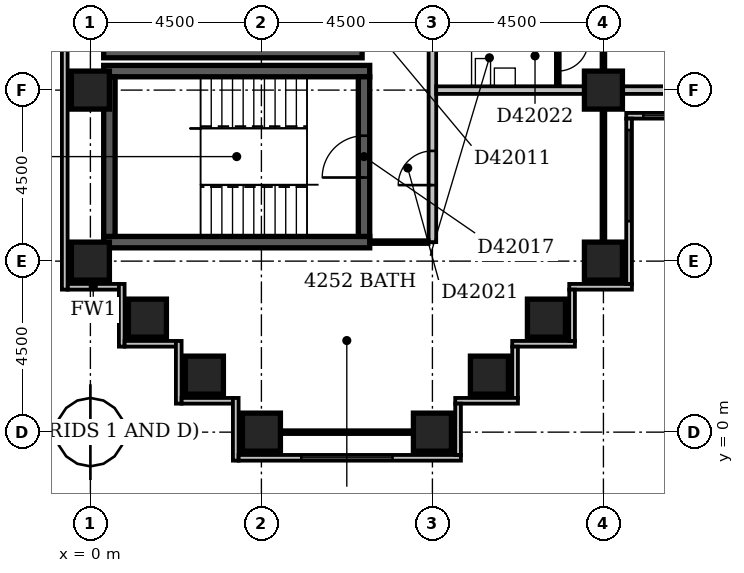
"""IFC4 building model, lengths in metres.
Left out: names, types, materials, properties, quantities, classifications, styles, units other than length and angle.
Written with IfcOpenShell. Run it as: python <this file> out.ifc"""

import sys

from ifc_helpers import new_model, si_unit, direction, frame, frame_2d, origin, origin_2d, place, context, subcontext, project, spatial, rectangle, extrude, element, fill, save


model = new_model("IFC4")
c1 = context("Model", 3, precision=1e-05, world=origin(), true_north=direction((0.0, 1.0)))
c2 = subcontext(c1, "Body", "Model", "MODEL_VIEW")
j1 = project(units=[si_unit("LENGTHUNIT", "METRE"), si_unit("PLANEANGLEUNIT", "RADIAN")], contexts=[c1])
p1 = place(None, origin())
s1 = spatial("IfcSite", under=j1, at=p1, CompositionType="ELEMENT")
p2 = place(p1, origin())
s2 = spatial("IfcBuilding", under=s1, at=p2, CompositionType="ELEMENT")
p3 = place(p2, frame((0.0, 0.0, 166.4)))
s3 = spatial("IfcBuildingStorey", under=s2, at=p3, CompositionType="ELEMENT", Elevation=166.4)
for number, where, z_axis, x_axis in (
    (1, (0.35, 5.0, -0.3), (0.0, 0.0, 1.0), (1.0, 0.0, 0.0)),
    (2, (0.35, 9.5, -0.3), (0.0, 0.0, 1.0), (1.0, 0.0, 0.0)),
):
    element("IfcWall", number, at=place(p3, frame(where, z_axis=z_axis, x_axis=x_axis)), inside=s3, PredefinedType="SHEAR", context=c2, shape_type="SweptSolid", body=[
        extrude(rectangle(XDim=7.0, YDim=0.3, at=frame_2d((3.5, 0.0))), origin(), (0.0, 0.0, 1.0), 3.6),
    ])
p4 = place(p3, frame((0.35, 10.0, -0.3), z_axis=(0.0, 0.0, 1.0), x_axis=(1.0, 0.0, 0.0)))
e3 = element("IfcWall", 3, at=p4, inside=s3, PredefinedType="SHEAR", context=c2, shape_type="SweptSolid", body=[
    extrude(rectangle(XDim=6.8, YDim=0.3, at=frame_2d((3.4, 0.0))), origin(), (0.0, 0.0, 1.0), 3.6),
])
p5 = place(p3, frame((0.5, 5.15, -0.3), z_axis=(0.0, 0.0, 1.0), x_axis=(0.0, 1.0, 0.0)))
e4 = element("IfcWall", 4, at=p5, inside=s3, PredefinedType="SHEAR", context=c2, shape_type="SweptSolid", body=[
    extrude(rectangle(XDim=4.2, YDim=0.3, at=frame_2d((2.1, 0.0))), origin(), (0.0, 0.0, 1.0), 3.6),
])
p6 = place(p3, frame((7.2, 5.15, -0.3), z_axis=(0.0, 0.0, 1.0), x_axis=(0.0, 1.0, 0.0)))
e5 = element("IfcWall", 5, at=p6, inside=s3, PredefinedType="SHEAR", context=c2, shape_type="SweptSolid", body=[
    extrude(rectangle(XDim=4.2, YDim=0.3, at=frame_2d((2.1, 0.0))), origin(), (0.0, 0.0, 1.0), 3.6),
])
p7 = place(p6, frame((1.55, 0.0, 0.3)))
e6 = element("IfcOpeningElement", 6, at=p7, cuts=e5, PredefinedType="OPENING", context=c2, shape_type="SweptSolid", body=[
    extrude(rectangle(XDim=1.1, YDim=2.1, at=frame_2d((0.55, 1.05))), frame((0.0, 0.162, 0.0), z_axis=(0.0, -1.0, 0.0), x_axis=(1.0, 0.0, 0.0)), (0.0, 0.0, 1.0), 0.324),
])
for number, where, z_axis, x_axis in (
    (7, (4.5, 0.0, -0.3), (0.0, 0.0, 1.0), (1.0, 0.0, 0.0)),
    (8, (9.0, 0.0, -0.3), (0.0, 0.0, 1.0), (1.0, 0.0, 0.0)),
    (9, (3.0, 1.5, -0.3), (0.0, 0.0, 1.0), (1.0, 0.0, 0.0)),
    (10, (10.5, 1.5, -0.3), (0.0, 0.0, 1.0), (1.0, 0.0, 0.0)),
    (11, (1.5, 3.0, -0.3), (0.0, 0.0, 1.0), (1.0, 0.0, 0.0)),
    (12, (12.0, 3.0, -0.3), (0.0, 0.0, 1.0), (1.0, 0.0, 0.0)),
    (13, (0.0, 4.5, -0.3), (0.0, 0.0, 1.0), (1.0, 0.0, 0.0)),
    (14, (13.5, 4.5, -0.3), (0.0, 0.0, 1.0), (1.0, 0.0, 0.0)),
    (15, (0.0, 9.0, -0.3), (0.0, 0.0, 1.0), (1.0, 0.0, 0.0)),
    (16, (13.5, 9.0, -0.3), (0.0, 0.0, 1.0), (1.0, 0.0, 0.0)),
):
    element("IfcColumn", number, at=place(p3, frame(where, z_axis=z_axis, x_axis=x_axis)), inside=s3, PredefinedType="COLUMN", context=c2, shape_type="SweptSolid", body=[
        extrude(rectangle(XDim=1.0, YDim=1.0, at=origin_2d()), origin(), (0.0, 0.0, 1.0), 3.6),
    ])
p8 = place(p3, frame((9.675, -0.6, 0.0), z_axis=(0.0, 0.0, 1.0), x_axis=(0.0, 1.0, 0.0)))
e17 = element("IfcWall", 17, at=p8, inside=s3, PredefinedType="STANDARD", context=c2, shape_type="SweptSolid", body=[
    extrude(rectangle(XDim=1.35, YDim=0.15, at=frame_2d((0.675, 0.0))), origin(), (0.0, 0.0, 1.0), 2.7),
])
p9 = place(p3, frame((9.6, 0.825, 0.0), z_axis=(0.0, 0.0, 1.0), x_axis=(1.0, 0.0, 0.0)))
e18 = element("IfcWall", 18, at=p9, inside=s3, PredefinedType="STANDARD", context=c2, shape_type="SweptSolid", body=[
    extrude(rectangle(XDim=1.65, YDim=0.15, at=frame_2d((0.825, 0.0))), origin(), (0.0, 0.0, 1.0), 2.7),
])
p10 = place(p3, frame((11.175, 0.9, 0.0), z_axis=(0.0, 0.0, 1.0), x_axis=(0.0, 1.0, 0.0)))
e19 = element("IfcWall", 19, at=p10, inside=s3, PredefinedType="STANDARD", context=c2, shape_type="SweptSolid", body=[
    extrude(rectangle(XDim=1.35, YDim=0.15, at=frame_2d((0.675, 0.0))), origin(), (0.0, 0.0, 1.0), 2.7),
])
p11 = place(p3, frame((11.1, 2.325, 0.0), z_axis=(0.0, 0.0, 1.0), x_axis=(1.0, 0.0, 0.0)))
e20 = element("IfcWall", 20, at=p11, inside=s3, PredefinedType="STANDARD", context=c2, shape_type="SweptSolid", body=[
    extrude(rectangle(XDim=1.65, YDim=0.15, at=frame_2d((0.825, 0.0))), origin(), (0.0, 0.0, 1.0), 2.7),
])
p12 = place(p3, frame((12.675, 2.4, 0.0), z_axis=(0.0, 0.0, 1.0), x_axis=(0.0, 1.0, 0.0)))
e21 = element("IfcWall", 21, at=p12, inside=s3, PredefinedType="STANDARD", context=c2, shape_type="SweptSolid", body=[
    extrude(rectangle(XDim=1.35, YDim=0.15, at=frame_2d((0.675, 0.0))), origin(), (0.0, 0.0, 1.0), 2.7),
])
p13 = place(p3, frame((12.6, 3.825, 0.0), z_axis=(0.0, 0.0, 1.0), x_axis=(1.0, 0.0, 0.0)))
e22 = element("IfcWall", 22, at=p13, inside=s3, PredefinedType="STANDARD", context=c2, shape_type="SweptSolid", body=[
    extrude(rectangle(XDim=1.65, YDim=0.15, at=frame_2d((0.825, 0.0))), origin(), (0.0, 0.0, 1.0), 2.7),
])
p14 = place(p3, frame((14.175, 3.9, 0.0), z_axis=(0.0, 0.0, 1.0), x_axis=(0.0, 1.0, 0.0)))
e23 = element("IfcWall", 23, at=p14, inside=s3, PredefinedType="STANDARD", context=c2, shape_type="SweptSolid", body=[
    extrude(rectangle(XDim=4.35, YDim=0.15, at=frame_2d((2.175, 0.0))), origin(), (0.0, 0.0, 1.0), 2.7),
])
p15 = place(p14, frame((1.65, 0.0, 0.6)))
e24 = element("IfcOpeningElement", 24, at=p15, cuts=e23, PredefinedType="OPENING", context=c2, shape_type="SweptSolid", body=[
    extrude(rectangle(XDim=2.4, YDim=1.8, at=frame_2d((1.2, 0.9))), frame((0.0, 0.087, 0.0), z_axis=(0.0, -1.0, 0.0), x_axis=(1.0, 0.0, 0.0)), (0.0, 0.0, 1.0), 0.174),
])
p16 = place(p3, frame((14.1, 8.325, 0.0), z_axis=(0.0, 0.0, 1.0), x_axis=(1.0, 0.0, 0.0)))
e25 = element("IfcWall", 25, at=p16, inside=s3, PredefinedType="STANDARD", context=c2, shape_type="SweptSolid", body=[
    extrude(rectangle(XDim=4.65, YDim=0.15, at=frame_2d((2.325, 0.0))), origin(), (0.0, 0.0, 1.0), 2.7),
])
p17 = place(p16, frame((0.45, 0.0, 0.6)))
e26 = element("IfcOpeningElement", 26, at=p17, cuts=e25, PredefinedType="OPENING", context=c2, shape_type="SweptSolid", body=[
    extrude(rectangle(XDim=2.4, YDim=1.8, at=frame_2d((1.2, 0.9))), frame((0.0, 0.087, 0.0), z_axis=(0.0, -1.0, 0.0), x_axis=(1.0, 0.0, 0.0)), (0.0, 0.0, 1.0), 0.174),
])
p18 = place(p3, frame((-0.675, 59.1, 0.0), z_axis=(0.0, 0.0, 1.0), x_axis=(0.0, -1.0, 0.0)))
e27 = element("IfcWall", 27, at=p18, inside=s3, PredefinedType="STANDARD", context=c2, shape_type="SweptSolid", body=[
    extrude(rectangle(XDim=55.35, YDim=0.15, at=frame_2d((27.675, 0.0))), origin(), (0.0, 0.0, 1.0), 2.7),
])
p19 = place(p18, frame((41.931, 0.0, 0.6)))
e28 = element("IfcOpeningElement", 28, at=p19, cuts=e27, PredefinedType="OPENING", context=c2, shape_type="SweptSolid", body=[
    extrude(rectangle(XDim=1.5, YDim=1.8, at=frame_2d((0.75, 0.9))), frame((0.0, 0.087, 0.0), z_axis=(0.0, -1.0, 0.0), x_axis=(1.0, 0.0, 0.0)), (0.0, 0.0, 1.0), 0.174),
])
p20 = place(p3, frame((-0.6, 3.825, 0.0), z_axis=(0.0, 0.0, 1.0), x_axis=(1.0, 0.0, 0.0)))
e29 = element("IfcWall", 29, at=p20, inside=s3, PredefinedType="STANDARD", context=c2, shape_type="SweptSolid", body=[
    extrude(rectangle(XDim=1.35, YDim=0.15, at=frame_2d((0.675, 0.0))), origin(), (0.0, 0.0, 1.0), 2.7),
])
p21 = place(p3, frame((0.825, 3.9, 0.0), z_axis=(0.0, 0.0, 1.0), x_axis=(0.0, -1.0, 0.0)))
e30 = element("IfcWall", 30, at=p21, inside=s3, PredefinedType="STANDARD", context=c2, shape_type="SweptSolid", body=[
    extrude(rectangle(XDim=1.65, YDim=0.15, at=frame_2d((0.825, 0.0))), origin(), (0.0, 0.0, 1.0), 2.7),
])
p22 = place(p3, frame((0.9, 2.325, 0.0), z_axis=(0.0, 0.0, 1.0), x_axis=(1.0, 0.0, 0.0)))
e31 = element("IfcWall", 31, at=p22, inside=s3, PredefinedType="STANDARD", context=c2, shape_type="SweptSolid", body=[
    extrude(rectangle(XDim=1.35, YDim=0.15, at=frame_2d((0.675, 0.0))), origin(), (0.0, 0.0, 1.0), 2.7),
])
p23 = place(p3, frame((2.325, 2.4, 0.0), z_axis=(0.0, 0.0, 1.0), x_axis=(0.0, -1.0, 0.0)))
e32 = element("IfcWall", 32, at=p23, inside=s3, PredefinedType="STANDARD", context=c2, shape_type="SweptSolid", body=[
    extrude(rectangle(XDim=1.65, YDim=0.15, at=frame_2d((0.825, 0.0))), origin(), (0.0, 0.0, 1.0), 2.7),
])
p24 = place(p3, frame((2.4, 0.825, 0.0), z_axis=(0.0, 0.0, 1.0), x_axis=(1.0, 0.0, 0.0)))
e33 = element("IfcWall", 33, at=p24, inside=s3, PredefinedType="STANDARD", context=c2, shape_type="SweptSolid", body=[
    extrude(rectangle(XDim=1.35, YDim=0.15, at=frame_2d((0.675, 0.0))), origin(), (0.0, 0.0, 1.0), 2.7),
])
p25 = place(p3, frame((3.825, 0.9, 0.0), z_axis=(0.0, 0.0, 1.0), x_axis=(0.0, -1.0, 0.0)))
e34 = element("IfcWall", 34, at=p25, inside=s3, PredefinedType="STANDARD", context=c2, shape_type="SweptSolid", body=[
    extrude(rectangle(XDim=1.65, YDim=0.15, at=frame_2d((0.825, 0.0))), origin(), (0.0, 0.0, 1.0), 2.7),
])
p26 = place(p3, frame((3.9, -0.675, 0.0), z_axis=(0.0, 0.0, 1.0), x_axis=(1.0, 0.0, 0.0)))
e35 = element("IfcWall", 35, at=p26, inside=s3, PredefinedType="STANDARD", context=c2, shape_type="SweptSolid", body=[
    extrude(rectangle(XDim=5.85, YDim=0.15, at=frame_2d((2.925, 0.0))), origin(), (0.0, 0.0, 1.0), 2.7),
])
p27 = place(p26, frame((1.65, 0.0, 0.6)))
e36 = element("IfcOpeningElement", 36, at=p27, cuts=e35, PredefinedType="OPENING", context=c2, shape_type="SweptSolid", body=[
    extrude(rectangle(XDim=2.4, YDim=1.8, at=frame_2d((1.2, 0.9))), frame((0.0, 0.087, 0.0), z_axis=(0.0, -1.0, 0.0), x_axis=(1.0, 0.0, 0.0)), (0.0, 0.0, 1.0), 0.174),
])
p28 = place(p3, frame((5.0, 0.0, 0.0), z_axis=(0.0, 0.0, 1.0), x_axis=(1.0, 0.0, 0.0)))
e37 = element("IfcWall", 37, at=p28, inside=s3, PredefinedType="PARTITIONING", context=c2, shape_type="SweptSolid", body=[
    extrude(rectangle(XDim=3.5, YDim=0.1, at=frame_2d((1.75, 0.0))), origin(), (0.0, 0.0, 1.0), 2.7),
])
p29 = place(p3, frame((0.0, 4.5, 0.0), z_axis=(0.0, 0.0, 1.0), x_axis=(0.0, 1.0, 0.0)))
e38 = element("IfcWall", 38, at=p29, inside=s3, PredefinedType="PARTITIONING", context=c2, shape_type="SweptSolid", body=[
    extrude(rectangle(XDim=0.5, YDim=0.1, at=frame_2d((0.25, 0.0))), origin(), (0.0, 0.0, 1.0), 2.7),
])
p30 = place(p3, frame((7.349, 5.0, 0.0), z_axis=(0.0, 0.0, 1.0), x_axis=(1.0, 0.0, 0.0)))
e39 = element("IfcWall", 39, at=p30, inside=s3, PredefinedType="PARTITIONING", context=c2, shape_type="SweptSolid", body=[
    extrude(rectangle(XDim=1.551, YDim=0.1, at=frame_2d((0.775, 0.0))), origin(), (0.0, 0.0, 1.0), 3.3),
])
p31 = place(p3, frame((9.0, 5.0, 0.0), z_axis=(0.0, 0.0, 1.0), x_axis=(0.0, 1.0, 0.0)))
e40 = element("IfcWall", 40, at=p31, inside=s3, PredefinedType="PARTITIONING", context=c2, shape_type="SweptSolid", body=[
    extrude(rectangle(XDim=27.75, YDim=0.2, at=frame_2d((13.875, 0.0))), origin(), (0.0, 0.0, 1.0), 3.3),
])
p32 = place(p31, frame((13.3, 0.0, 0.0)))
e41 = element("IfcOpeningElement", 41, at=p32, cuts=e40, PredefinedType="OPENING", context=c2, shape_type="SweptSolid", body=[
    extrude(rectangle(XDim=1.0, YDim=2.1, at=frame_2d((0.5, 1.05))), frame((0.0, 0.112, 0.0), z_axis=(0.0, -1.0, 0.0), x_axis=(1.0, 0.0, 0.0)), (0.0, 0.0, 1.0), 0.224),
])
p33 = place(p31, frame((10.45, 0.0, 0.0)))
e42 = element("IfcOpeningElement", 42, at=p33, cuts=e40, PredefinedType="OPENING", context=c2, shape_type="SweptSolid", body=[
    extrude(rectangle(XDim=1.0, YDim=2.1, at=frame_2d((0.5, 1.05))), frame((0.0, 0.112, 0.0), z_axis=(0.0, -1.0, 0.0), x_axis=(1.0, 0.0, 0.0)), (0.0, 0.0, 1.0), 0.224),
])
p34 = place(p31, frame((5.95, 0.0, 0.0)))
e43 = element("IfcOpeningElement", 43, at=p34, cuts=e40, PredefinedType="OPENING", context=c2, shape_type="SweptSolid", body=[
    extrude(rectangle(XDim=1.0, YDim=2.1, at=frame_2d((0.5, 1.05))), frame((0.0, 0.112, 0.0), z_axis=(0.0, -1.0, 0.0), x_axis=(1.0, 0.0, 0.0)), (0.0, 0.0, 1.0), 0.224),
])
p35 = place(p31, frame((1.5, 0.0, 0.0)))
e44 = element("IfcOpeningElement", 44, at=p35, cuts=e40, PredefinedType="OPENING", context=c2, shape_type="SweptSolid", body=[
    extrude(rectangle(XDim=0.9, YDim=2.1, at=frame_2d((0.45, 1.05))), frame((0.0, 0.112, 0.0), z_axis=(0.0, -1.0, 0.0), x_axis=(1.0, 0.0, 0.0)), (0.0, 0.0, 1.0), 0.224),
])
p36 = place(p3, frame((13.5, 5.0, 0.0), z_axis=(0.0, 0.0, 1.0), x_axis=(0.0, 1.0, 0.0)))
e45 = element("IfcWall", 45, at=p36, inside=s3, PredefinedType="PARTITIONING", context=c2, shape_type="SweptSolid", body=[
    extrude(rectangle(XDim=3.5, YDim=0.1, at=frame_2d((1.75, 0.0))), origin(), (0.0, 0.0, 1.0), 2.7),
])
p37 = place(p3, frame((9.1, 9.0, 0.0), z_axis=(0.0, 0.0, 1.0), x_axis=(1.0, 0.0, 0.0)))
e46 = element("IfcWall", 46, at=p37, inside=s3, PredefinedType="PARTITIONING", context=c2, shape_type="SweptSolid", body=[
    extrude(rectangle(XDim=3.9, YDim=0.2, at=frame_2d((1.95, 0.0))), origin(), (0.0, 0.0, 1.0), 3.3),
])
p38 = place(p3, frame((14.0, 9.0, 0.0), z_axis=(0.0, 0.0, 1.0), x_axis=(1.0, 0.0, 0.0)))
e47 = element("IfcWall", 47, at=p38, inside=s3, PredefinedType="PARTITIONING", context=c2, shape_type="SweptSolid", body=[
    extrude(rectangle(XDim=3.5, YDim=0.2, at=frame_2d((1.75, 0.0))), origin(), (0.0, 0.0, 1.0), 2.7),
])
p39 = place(p3, frame((12.3, 9.1, 0.0), z_axis=(0.0, 0.0, 1.0), x_axis=(0.0, 1.0, 0.0)))
e48 = element("IfcWall", 48, at=p39, inside=s3, PredefinedType="PARTITIONING", context=c2, shape_type="SweptSolid", body=[
    extrude(rectangle(XDim=1.6, YDim=0.1, at=frame_2d((0.8, 0.0))), origin(), (0.0, 0.0, 1.0), 3.3),
])
p40 = place(p39, frame((0.4, 0.0, 0.0)))
e49 = element("IfcOpeningElement", 49, at=p40, cuts=e48, PredefinedType="OPENING", context=c2, shape_type="SweptSolid", body=[
    extrude(rectangle(XDim=0.8, YDim=2.1, at=frame_2d((0.4, 1.05))), frame((0.0, 0.062, 0.0), z_axis=(0.0, -1.0, 0.0), x_axis=(1.0, 0.0, 0.0)), (0.0, 0.0, 1.0), 0.124),
])
p41 = place(p3, frame((13.5, 9.5, 0.0), z_axis=(0.0, 0.0, 1.0), x_axis=(0.0, 1.0, 0.0)))
e50 = element("IfcWall", 50, at=p41, inside=s3, PredefinedType="PARTITIONING", context=c2, shape_type="SweptSolid", body=[
    extrude(rectangle(XDim=8.4, YDim=0.1, at=frame_2d((4.2, 0.0))), origin(), (0.0, 0.0, 1.0), 3.3),
])
p42 = place(p41, frame((5.8, 0.0, 0.0)))
e51 = element("IfcOpeningElement", 51, at=p42, cuts=e50, PredefinedType="OPENING", context=c2, shape_type="SweptSolid", body=[
    extrude(rectangle(XDim=0.9, YDim=2.1, at=frame_2d((0.45, 1.05))), frame((0.0, 0.062, 0.0), z_axis=(0.0, -1.0, 0.0), x_axis=(1.0, 0.0, 0.0)), (0.0, 0.0, 1.0), 0.124),
])
p43 = place(p41, frame((1.3, 0.0, 0.0)))
e52 = element("IfcOpeningElement", 52, at=p43, cuts=e50, PredefinedType="OPENING", context=c2, shape_type="SweptSolid", body=[
    extrude(rectangle(XDim=0.9, YDim=2.1, at=frame_2d((0.45, 1.05))), frame((0.0, 0.062, 0.0), z_axis=(0.0, -1.0, 0.0), x_axis=(1.0, 0.0, 0.0)), (0.0, 0.0, 1.0), 0.124),
])
p44 = place(p15, origin())
e53 = element("IfcWindow", 53, at=p44, inside=s3, PartitioningType="SINGLE_PANEL", PredefinedType="WINDOW", context=c2, shape_type="SweptSolid", body=[
    extrude(rectangle(XDim=2.4, YDim=1.8, at=frame_2d((1.2, 0.9))), frame((0.0, 0.03, 0.0), z_axis=(0.0, -1.0, 0.0), x_axis=(1.0, 0.0, 0.0)), (0.0, 0.0, 1.0), 0.06),
])
fill(e24, e53)
p45 = place(p17, origin())
e54 = element("IfcWindow", 54, at=p45, inside=s3, PartitioningType="SINGLE_PANEL", PredefinedType="WINDOW", context=c2, shape_type="SweptSolid", body=[
    extrude(rectangle(XDim=2.4, YDim=1.8, at=frame_2d((1.2, 0.9))), frame((0.0, 0.03, 0.0), z_axis=(0.0, -1.0, 0.0), x_axis=(1.0, 0.0, 0.0)), (0.0, 0.0, 1.0), 0.06),
])
fill(e26, e54)
p46 = place(p27, origin())
e55 = element("IfcWindow", 55, at=p46, inside=s3, PartitioningType="SINGLE_PANEL", PredefinedType="WINDOW", context=c2, shape_type="SweptSolid", body=[
    extrude(rectangle(XDim=2.4, YDim=1.8, at=frame_2d((1.2, 0.9))), frame((0.0, 0.03, 0.0), z_axis=(0.0, -1.0, 0.0), x_axis=(1.0, 0.0, 0.0)), (0.0, 0.0, 1.0), 0.06),
])
fill(e36, e55)
p47 = place(p7, origin())
e56 = element("IfcDoor", 56, at=p47, inside=s3, OperationType="SINGLE_SWING_LEFT", PredefinedType="DOOR", context=c2, shape_type="SweptSolid", body=[
    extrude(rectangle(XDim=1.1, YDim=2.1, at=frame_2d((0.55, 1.05))), frame((0.0, 0.025, 0.0), z_axis=(0.0, -1.0, 0.0), x_axis=(1.0, 0.0, 0.0)), (0.0, 0.0, 1.0), 0.05),
])
fill(e6, e56)
p48 = place(p35, origin())
e57 = element("IfcDoor", 57, at=p48, inside=s3, OperationType="SINGLE_SWING_LEFT", PredefinedType="DOOR", context=c2, shape_type="SweptSolid", body=[
    extrude(rectangle(XDim=0.9, YDim=2.1, at=frame_2d((0.45, 1.05))), frame((0.0, 0.025, 0.0), z_axis=(0.0, -1.0, 0.0), x_axis=(1.0, 0.0, 0.0)), (0.0, 0.0, 1.0), 0.05),
])
fill(e44, e57)
p49 = place(p40, origin())
e58 = element("IfcDoor", 58, at=p49, inside=s3, OperationType="SINGLE_SWING_RIGHT", PredefinedType="DOOR", context=c2, shape_type="SweptSolid", body=[
    extrude(rectangle(XDim=0.8, YDim=2.1, at=frame_2d((0.4, 1.05))), frame((0.0, 0.025, 0.0), z_axis=(0.0, -1.0, 0.0), x_axis=(1.0, 0.0, 0.0)), (0.0, 0.0, 1.0), 0.05),
])
fill(e49, e58)
save(model, sys.argv[1])
